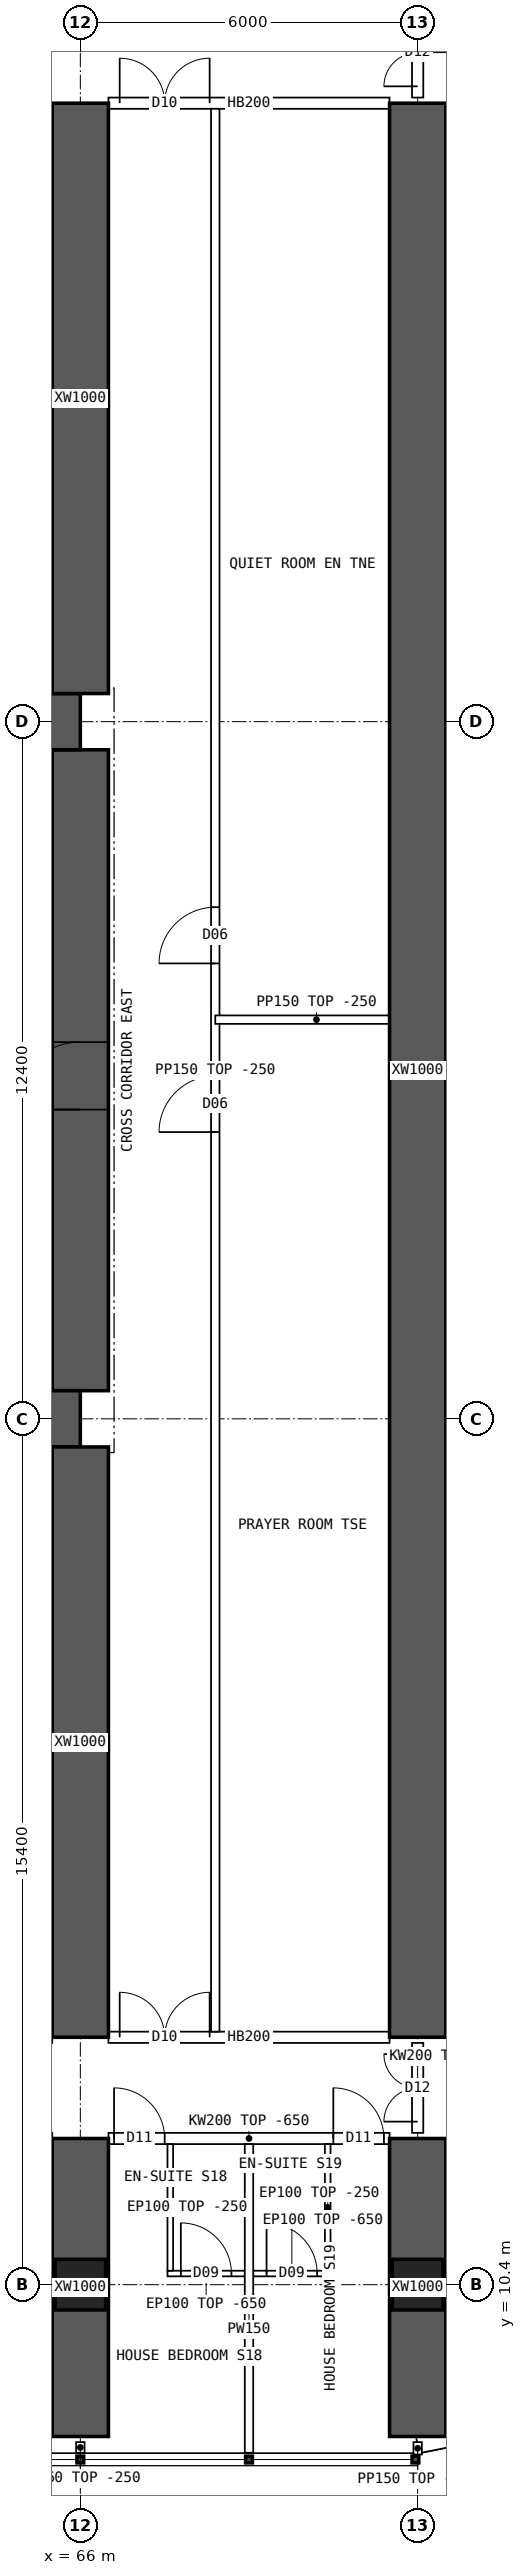
"""IFC4 building model, lengths in metres.
Left out: names, types, materials, properties, quantities, classifications, styles, units other than length and angle.
Written with IfcOpenShell. Run it as: python <this file> out.ifc"""

import sys

from ifc_helpers import new_model, si_unit, direction, frame, frame_2d, origin, origin_2d, place, context, subcontext, project, spatial, polyline, rectangle, hollow_rectangle, outline, extrude, element, fill, save


model = new_model("IFC4")
c1 = context("Model", 3, precision=1e-05, world=origin(), true_north=direction((0.0, 1.0)))
c2 = subcontext(c1, "Body", "Model", "MODEL_VIEW")
j1 = project(units=[si_unit("LENGTHUNIT", "METRE"), si_unit("PLANEANGLEUNIT", "RADIAN")], contexts=[c1])
p1 = place(None, origin())
s1 = spatial("IfcSite", under=j1, at=p1, CompositionType="ELEMENT")
p2 = place(p1, origin())
s2 = spatial("IfcBuilding", under=s1, at=p2, CompositionType="ELEMENT")
p3 = place(p2, frame((0.0, 0.0, 31.45)))
s3 = spatial("IfcBuildingStorey", under=s2, at=p3, CompositionType="ELEMENT", Elevation=31.45)
for number, where, z_axis, x_axis in (
    (1, (66.0, 10.4, 0.0), (0.0, 0.0, 1.0), (1.0, 0.0, 0.0)),
    (2, (72.0, 10.4, 0.0), (0.0, 0.0, 1.0), (1.0, 0.0, 0.0)),
):
    element("IfcColumn", number, at=place(p3, frame(where, z_axis=z_axis, x_axis=x_axis)), inside=s3, PredefinedType="COLUMN", context=c2, shape_type="SweptSolid", body=[
        extrude(hollow_rectangle(XDim=0.9, YDim=0.9, WallThickness=0.09, at=origin_2d()), origin(), (0.0, 0.0, 1.0), 3.75),
    ])
for number, where, z_axis, x_axis in (
    (3, (18.0, 25.8, 0.0), (0.0, 0.0, 1.0), (1.0, 0.0, 0.0)),
    (4, (18.0, 38.2, 0.0), (0.0, 0.0, 1.0), (1.0, 0.0, 0.0)),
):
    element("IfcWall", number, at=place(p3, frame(where, z_axis=z_axis, x_axis=x_axis)), inside=s3, PredefinedType="SHEAR", context=c2, shape_type="SweptSolid", body=[
        extrude(rectangle(XDim=48.0, YDim=1.0, at=frame_2d((24.0, 0.0))), origin(), (0.0, 0.0, 1.0), 3.75),
    ])
p4 = place(p3, frame((66.0, 26.3, 0.0), z_axis=(0.0, 0.0, 1.0), x_axis=(0.0, 1.0, 0.0)))
e5 = element("IfcWall", 5, at=p4, inside=s3, PredefinedType="SHEAR", context=c2, shape_type="SweptSolid", body=[
    extrude(rectangle(XDim=11.4, YDim=1.0, at=frame_2d((5.7, 0.0))), origin(), (0.0, 0.0, 1.0), 3.75),
])
p5 = place(p4, frame((5.0, 0.0, 0.0)))
e6 = element("IfcOpeningElement", 6, at=p5, cuts=e5, PredefinedType="OPENING", context=c2, shape_type="SweptSolid", body=[
    extrude(rectangle(XDim=1.2, YDim=2.1, at=frame_2d((0.6, 1.05))), frame((0.0, 0.51, 0.0), z_axis=(0.0, -1.0, 0.0), x_axis=(1.0, 0.0, 0.0)), (0.0, 0.0, 1.0), 1.02),
])
p6 = place(p3, frame((66.0, 7.7, 0.0), z_axis=(0.0, 0.0, 1.0), x_axis=(0.0, 1.0, 0.0)))
e7 = element("IfcWall", 7, at=p6, inside=s3, PredefinedType="SHEAR", context=c2, shape_type="SweptSolid", body=[
    extrude(rectangle(XDim=5.3, YDim=1.0, at=frame_2d((2.65, 0.0))), origin(), (0.0, 0.0, 1.0), 3.75),
])
for number, where, z_axis, x_axis in (
    (8, (66.0, 14.8, 0.0), (0.0, 0.0, 1.0), (0.0, 1.0, 0.0)),
    (9, (66.0, 38.7, 0.0), (0.0, 0.0, 1.0), (0.0, 1.0, 0.0)),
):
    element("IfcWall", number, at=place(p3, frame(where, z_axis=z_axis, x_axis=x_axis)), inside=s3, PredefinedType="SHEAR", context=c2, shape_type="SweptSolid", body=[
        extrude(rectangle(XDim=10.5, YDim=1.0, at=frame_2d((5.25, 0.0))), origin(), (0.0, 0.0, 1.0), 3.75),
    ])
p7 = place(p3, frame((72.0, 7.7, 0.0), z_axis=(0.0, 0.0, 1.0), x_axis=(0.0, 1.0, 0.0)))
e10 = element("IfcWall", 10, at=p7, inside=s3, PredefinedType="SHEAR", context=c2, shape_type="SweptSolid", body=[
    extrude(rectangle(XDim=5.3, YDim=1.0, at=frame_2d((2.65, 0.0))), origin(), (0.0, 0.0, 1.0), 3.75),
])
p8 = place(p3, frame((72.0, 14.8, 0.0), z_axis=(0.0, 0.0, 1.0), x_axis=(0.0, 1.0, 0.0)))
e11 = element("IfcWall", 11, at=p8, inside=s3, PredefinedType="SHEAR", context=c2, shape_type="SweptSolid", body=[
    extrude(rectangle(XDim=34.4, YDim=1.0, at=frame_2d((17.2, 0.0))), origin(), (0.0, 0.0, 1.0), 3.75),
])
p9 = place(p3, frame((72.0, 7.55, 0.0), z_axis=(0.0, 0.0, 1.0), x_axis=(0.980787251524, 0.195080412259, 0.0)))
e12 = element("IfcWall", 12, at=p9, inside=s3, PredefinedType="SOLIDWALL", context=c2, shape_type="SweptSolid", body=[
    extrude(outline(polyline([(-0.03, -0.15), (3.249, -0.15), (3.189, 0.15), (0.03, 0.15), (-0.03, -0.15)])), origin(), (0.0, 0.0, 1.0), 3.5),
])
p10 = place(p9, frame((0.909, 0.0, 0.9)))
e13 = element("IfcOpeningElement", 13, at=p10, cuts=e12, PredefinedType="OPENING", context=c2, shape_type="SweptSolid", body=[
    extrude(rectangle(XDim=1.4, YDim=1.8, at=frame_2d((0.7, 0.9))), frame((0.0, 0.16, 0.0), z_axis=(0.0, -1.0, 0.0), x_axis=(1.0, 0.0, 0.0)), (0.0, 0.0, 1.0), 0.32),
])
p11 = place(p3, frame((66.5, 13.0, 0.0), z_axis=(0.0, 0.0, 1.0), x_axis=(1.0, 0.0, 0.0)))
e14 = element("IfcWall", 14, at=p11, inside=s3, PredefinedType="SOLIDWALL", context=c2, shape_type="SweptSolid", body=[
    extrude(outline(polyline([(0.0, 0.0), (5.0, 0.0), (5.0, 3.1), (0.0, 3.1), (0.0, 0.0)])), frame((0.0, 0.1, 0.0), z_axis=(0.0, -1.0, 0.0), x_axis=(1.0, 0.0, 0.0)), (0.0, 0.0, 1.0), 0.2),
])
p12 = place(p11, frame((0.1, 0.0, 0.0)))
e15 = element("IfcOpeningElement", 15, at=p12, cuts=e14, PredefinedType="OPENING", context=c2, shape_type="SweptSolid", body=[
    extrude(rectangle(XDim=0.9, YDim=2.1, at=frame_2d((0.45, 1.05))), frame((0.0, 0.11, 0.0), z_axis=(0.0, -1.0, 0.0), x_axis=(1.0, 0.0, 0.0)), (0.0, 0.0, 1.0), 0.22),
])
p13 = place(p11, frame((4.0, 0.0, 0.0)))
e16 = element("IfcOpeningElement", 16, at=p13, cuts=e14, PredefinedType="OPENING", context=c2, shape_type="SweptSolid", body=[
    extrude(rectangle(XDim=0.9, YDim=2.1, at=frame_2d((0.45, 1.05))), frame((0.0, 0.11, 0.0), z_axis=(0.0, -1.0, 0.0), x_axis=(1.0, 0.0, 0.0)), (0.0, 0.0, 1.0), 0.22),
])
p14 = place(p3, frame((66.5, 14.8, 0.0), z_axis=(0.0, 0.0, 1.0), x_axis=(1.0, 0.0, 0.0)))
e17 = element("IfcWall", 17, at=p14, inside=s3, PredefinedType="SOLIDWALL", context=c2, shape_type="SweptSolid", body=[
    extrude(rectangle(XDim=5.0, YDim=0.2, at=frame_2d((2.5, 0.0))), origin(), (0.0, 0.0, 1.0), 3.5),
])
p15 = place(p14, frame((0.2, 0.0, 0.0)))
e18 = element("IfcOpeningElement", 18, at=p15, cuts=e17, PredefinedType="OPENING", context=c2, shape_type="SweptSolid", body=[
    extrude(rectangle(XDim=1.6, YDim=2.1, at=frame_2d((0.8, 1.05))), frame((0.0, 0.11, 0.0), z_axis=(0.0, -1.0, 0.0), x_axis=(1.0, 0.0, 0.0)), (0.0, 0.0, 1.0), 0.22),
])
p16 = place(p3, frame((66.5, 49.2, 0.0), z_axis=(0.0, 0.0, 1.0), x_axis=(1.0, 0.0, 0.0)))
e19 = element("IfcWall", 19, at=p16, inside=s3, PredefinedType="SOLIDWALL", context=c2, shape_type="SweptSolid", body=[
    extrude(rectangle(XDim=5.0, YDim=0.2, at=frame_2d((2.5, 0.0))), origin(), (0.0, 0.0, 1.0), 3.5),
])
p17 = place(p16, frame((0.2, 0.0, 0.0)))
e20 = element("IfcOpeningElement", 20, at=p17, cuts=e19, PredefinedType="OPENING", context=c2, shape_type="SweptSolid", body=[
    extrude(rectangle(XDim=1.6, YDim=2.1, at=frame_2d((0.8, 1.05))), frame((0.0, 0.11, 0.0), z_axis=(0.0, -1.0, 0.0), x_axis=(1.0, 0.0, 0.0)), (0.0, 0.0, 1.0), 0.22),
])
p18 = place(p3, frame((69.0, 7.41, 0.0), z_axis=(0.0, 0.0, 1.0), x_axis=(0.0, 1.0, 0.0)))
e21 = element("IfcWall", 21, at=p18, inside=s3, PredefinedType="PARTITIONING", context=c2, shape_type="SweptSolid", body=[
    extrude(outline(polyline([(0.0, 0.0), (5.49, 0.0), (5.49, 3.1), (5.442, 3.1), (5.44, 3.5), (3.192, 3.5), (3.19, 3.1), (2.792, 3.1), (2.79, 3.5), (0.0, 3.5), (0.0, 0.0)])), frame((0.0, 0.075, 0.0), z_axis=(0.0, -1.0, 0.0), x_axis=(1.0, 0.0, 0.0)), (0.0, 0.0, 1.0), 0.15),
])
p19 = place(p3, frame((68.925, 10.598, 0.0), z_axis=(0.0, 0.0, 1.0), x_axis=(-1.0, 0.0, 0.0)))
e22 = element("IfcWall", 22, at=p19, inside=s3, PredefinedType="PARTITIONING", context=c2, shape_type="SweptSolid", body=[
    extrude(outline(polyline([(0.0, 0.0), (1.375, 0.0), (1.375, 3.1), (0.0, 3.1), (0.0, 0.0)])), frame((0.0, 0.05, 0.0), z_axis=(0.0, -1.0, 0.0), x_axis=(1.0, 0.0, 0.0)), (0.0, 0.0, 1.0), 0.1),
])
p20 = place(p19, frame((0.238, 0.0, 0.0)))
e23 = element("IfcOpeningElement", 23, at=p20, cuts=e22, PredefinedType="OPENING", context=c2, shape_type="SweptSolid", body=[
    extrude(rectangle(XDim=0.9, YDim=2.1, at=frame_2d((0.45, 1.05))), frame((0.0, 0.06, 0.0), z_axis=(0.0, -1.0, 0.0), x_axis=(1.0, 0.0, 0.0)), (0.0, 0.0, 1.0), 0.12),
])
p21 = place(p3, frame((67.6, 10.648, 0.0), z_axis=(0.0, 0.0, 1.0), x_axis=(0.0, 1.0, 0.0)))
e24 = element("IfcWall", 24, at=p21, inside=s3, PredefinedType="PARTITIONING", context=c2, shape_type="SweptSolid", body=[
    extrude(outline(polyline([(0.0, 0.0), (2.252, 0.0), (2.252, 3.1), (2.204, 3.1), (2.202, 3.5), (0.0, 3.5), (0.0, 0.0)])), frame((0.0, 0.05, 0.0), z_axis=(0.0, -1.0, 0.0), x_axis=(1.0, 0.0, 0.0)), (0.0, 0.0, 1.0), 0.1),
])
p22 = place(p3, frame((70.45, 10.598, 0.0), z_axis=(0.0, 0.0, 1.0), x_axis=(-1.0, 0.0, 0.0)))
e25 = element("IfcWall", 25, at=p22, inside=s3, PredefinedType="PARTITIONING", context=c2, shape_type="SweptSolid", body=[
    extrude(outline(polyline([(0.0, 0.0), (1.375, 0.0), (1.375, 3.1), (0.0, 3.1), (0.0, 0.0)])), frame((0.0, 0.05, 0.0), z_axis=(0.0, -1.0, 0.0), x_axis=(1.0, 0.0, 0.0)), (0.0, 0.0, 1.0), 0.1),
])
p23 = place(p22, frame((0.238, 0.0, 0.0)))
e26 = element("IfcOpeningElement", 26, at=p23, cuts=e25, PredefinedType="OPENING", context=c2, shape_type="SweptSolid", body=[
    extrude(rectangle(XDim=0.9, YDim=2.1, at=frame_2d((0.45, 1.05))), frame((0.0, 0.06, 0.0), z_axis=(0.0, -1.0, 0.0), x_axis=(1.0, 0.0, 0.0)), (0.0, 0.0, 1.0), 0.12),
])
p24 = place(p3, frame((70.4, 10.648, 0.0), z_axis=(0.0, 0.0, 1.0), x_axis=(0.0, 1.0, 0.0)))
e27 = element("IfcWall", 27, at=p24, inside=s3, PredefinedType="PARTITIONING", context=c2, shape_type="SweptSolid", body=[
    extrude(outline(polyline([(0.0, 0.0), (2.252, 0.0), (2.252, 3.1), (2.204, 3.1), (2.202, 3.5), (0.0, 3.5), (0.0, 0.0)])), frame((0.0, 0.05, 0.0), z_axis=(0.0, -1.0, 0.0), x_axis=(1.0, 0.0, 0.0)), (0.0, 0.0, 1.0), 0.1),
])
p25 = place(p3, frame((68.4, 14.9, 0.0), z_axis=(0.0, 0.0, 1.0), x_axis=(0.0, 1.0, 0.0)))
e28 = element("IfcWall", 28, at=p25, inside=s3, PredefinedType="PARTITIONING", context=c2, shape_type="SweptSolid", body=[
    extrude(rectangle(XDim=34.2, YDim=0.15, at=frame_2d((17.1, 0.0))), origin(), (0.0, 0.0, 1.0), 3.5),
])
p26 = place(p25, frame((16.0, 0.0, 0.0)))
e29 = element("IfcOpeningElement", 29, at=p26, cuts=e28, PredefinedType="OPENING", context=c2, shape_type="SweptSolid", body=[
    extrude(rectangle(XDim=1.0, YDim=2.1, at=frame_2d((0.5, 1.05))), frame((0.0, 0.085, 0.0), z_axis=(0.0, -1.0, 0.0), x_axis=(1.0, 0.0, 0.0)), (0.0, 0.0, 1.0), 0.17),
])
p27 = place(p25, frame((19.0, 0.0, 0.0)))
e30 = element("IfcOpeningElement", 30, at=p27, cuts=e28, PredefinedType="OPENING", context=c2, shape_type="SweptSolid", body=[
    extrude(rectangle(XDim=1.0, YDim=2.1, at=frame_2d((0.5, 1.05))), frame((0.0, 0.085, 0.0), z_axis=(0.0, -1.0, 0.0), x_axis=(1.0, 0.0, 0.0)), (0.0, 0.0, 1.0), 0.17),
])
p28 = place(p3, frame((68.4, 32.9, 0.0), z_axis=(0.0, 0.0, 1.0), x_axis=(1.0, 0.0, 0.0)))
e31 = element("IfcWall", 31, at=p28, inside=s3, PredefinedType="PARTITIONING", context=c2, shape_type="SweptSolid", body=[
    extrude(rectangle(XDim=3.6, YDim=0.15, at=frame_2d((1.8, 0.0))), origin(), (0.0, 0.0, 1.0), 3.5),
])
p29 = place(p3, frame((72.075, 30.85, 0.0), z_axis=(0.0, 0.0, 1.0), x_axis=(1.0, 0.0, 0.0)))
e32 = element("IfcWall", 32, at=p29, inside=s3, PredefinedType="PARTITIONING", context=c2, shape_type="SweptSolid", body=[
    extrude(outline(polyline([(0.0, 0.0), (8.02, 0.0), (8.02, 3.5), (6.227, 3.5), (6.225, 3.05), (5.627, 3.05), (5.625, 3.5), (0.0, 3.5), (0.0, 0.0)])), frame((0.0, 0.075, 0.0), z_axis=(0.0, -1.0, 0.0), x_axis=(1.0, 0.0, 0.0)), (0.0, 0.0, 1.0), 0.15),
])
p30 = place(p3, frame((72.0, 13.1, 0.0), z_axis=(0.0, 0.0, 1.0), x_axis=(0.0, 1.0, 0.0)))
e33 = element("IfcWall", 33, at=p30, inside=s3, PredefinedType="SOLIDWALL", context=c2, shape_type="SweptSolid", body=[
    extrude(outline(polyline([(0.0, 0.0), (1.6, 0.0), (1.6, 3.05), (0.0, 3.05), (0.0, 0.0)])), frame((0.0, 0.1, 0.0), z_axis=(0.0, -1.0, 0.0), x_axis=(1.0, 0.0, 0.0)), (0.0, 0.0, 1.0), 0.2),
])
p31 = place(p30, frame((0.2, 0.0, 0.0)))
e34 = element("IfcOpeningElement", 34, at=p31, cuts=e33, PredefinedType="OPENING", context=c2, shape_type="SweptSolid", body=[
    extrude(rectangle(XDim=1.2, YDim=2.1, at=frame_2d((0.6, 1.05))), frame((0.0, 0.11, 0.0), z_axis=(0.0, -1.0, 0.0), x_axis=(1.0, 0.0, 0.0)), (0.0, 0.0, 1.0), 0.22),
])
p32 = place(p3, frame((72.0, 49.3, 0.0), z_axis=(0.0, 0.0, 1.0), x_axis=(0.0, 1.0, 0.0)))
e35 = element("IfcWall", 35, at=p32, inside=s3, PredefinedType="SOLIDWALL", context=c2, shape_type="SweptSolid", body=[
    extrude(outline(polyline([(0.0, 0.0), (1.6, 0.0), (1.6, 3.05), (0.0, 3.05), (0.0, 0.0)])), frame((0.0, 0.1, 0.0), z_axis=(0.0, -1.0, 0.0), x_axis=(1.0, 0.0, 0.0)), (0.0, 0.0, 1.0), 0.2),
])
p33 = place(p32, frame((0.2, 0.0, 0.0)))
e36 = element("IfcOpeningElement", 36, at=p33, cuts=e35, PredefinedType="OPENING", context=c2, shape_type="SweptSolid", body=[
    extrude(rectangle(XDim=1.2, YDim=2.1, at=frame_2d((0.6, 1.05))), frame((0.0, 0.11, 0.0), z_axis=(0.0, -1.0, 0.0), x_axis=(1.0, 0.0, 0.0)), (0.0, 0.0, 1.0), 0.22),
])
p34 = place(p3, frame((66.0, 7.6, 0.0), z_axis=(0.0, 0.0, 1.0), x_axis=(0.0, -1.0, 0.0)))
e37 = element("IfcWall", 37, at=p34, inside=s3, PredefinedType="PARTITIONING", context=c2, shape_type="SweptSolid", body=[
    extrude(rectangle(XDim=0.19, YDim=0.15, at=frame_2d((0.095, 0.0))), origin(), (0.0, 0.0, 1.0), 3.5),
])
p35 = place(p3, frame((72.0, 7.6, 0.0), z_axis=(0.0, 0.0, 1.0), x_axis=(0.0, -1.0, 0.0)))
e38 = element("IfcWall", 38, at=p35, inside=s3, PredefinedType="PARTITIONING", context=c2, shape_type="SweptSolid", body=[
    extrude(rectangle(XDim=0.22, YDim=0.15, at=frame_2d((0.11, 0.0))), origin(), (0.0, 0.0, 1.0), 3.5),
])
p36 = place(p5, origin())
e39 = element("IfcDoor", 39, at=p36, inside=s3, OperationType="SINGLE_SWING_LEFT", PredefinedType="DOOR", context=c2, shape_type="SweptSolid", body=[
    extrude(rectangle(XDim=1.2, YDim=2.1, at=frame_2d((0.6, 1.05))), frame((0.0, 0.025, 0.0), z_axis=(0.0, -1.0, 0.0), x_axis=(1.0, 0.0, 0.0)), (0.0, 0.0, 1.0), 0.05),
])
fill(e6, e39)
p37 = place(p15, origin())
e40 = element("IfcDoor", 40, at=p37, inside=s3, OperationType="DOUBLE_DOOR_SINGLE_SWING", PredefinedType="DOOR", context=c2, shape_type="SweptSolid", body=[
    extrude(rectangle(XDim=1.6, YDim=2.1, at=frame_2d((0.8, 1.05))), frame((0.0, 0.025, 0.0), z_axis=(0.0, -1.0, 0.0), x_axis=(1.0, 0.0, 0.0)), (0.0, 0.0, 1.0), 0.05),
])
fill(e18, e40)
p38 = place(p17, origin())
e41 = element("IfcDoor", 41, at=p38, inside=s3, OperationType="DOUBLE_DOOR_SINGLE_SWING", PredefinedType="DOOR", context=c2, shape_type="SweptSolid", body=[
    extrude(rectangle(XDim=1.6, YDim=2.1, at=frame_2d((0.8, 1.05))), frame((0.0, 0.025, 0.0), z_axis=(0.0, -1.0, 0.0), x_axis=(1.0, 0.0, 0.0)), (0.0, 0.0, 1.0), 0.05),
])
fill(e20, e41)
p39 = place(p20, origin())
e42 = element("IfcDoor", 42, at=p39, inside=s3, OperationType="SINGLE_SWING_RIGHT", PredefinedType="DOOR", context=c2, shape_type="SweptSolid", body=[
    extrude(rectangle(XDim=0.9, YDim=2.1, at=frame_2d((0.45, 1.05))), frame((0.0, 0.025, 0.0), z_axis=(0.0, -1.0, 0.0), x_axis=(1.0, 0.0, 0.0)), (0.0, 0.0, 1.0), 0.05),
])
fill(e23, e42)
p40 = place(p12, origin())
e43 = element("IfcDoor", 43, at=p40, inside=s3, OperationType="SINGLE_SWING_LEFT", PredefinedType="DOOR", context=c2, shape_type="SweptSolid", body=[
    extrude(rectangle(XDim=0.9, YDim=2.1, at=frame_2d((0.45, 1.05))), frame((0.0, 0.025, 0.0), z_axis=(0.0, -1.0, 0.0), x_axis=(1.0, 0.0, 0.0)), (0.0, 0.0, 1.0), 0.05),
])
fill(e15, e43)
p41 = place(p23, origin())
e44 = element("IfcDoor", 44, at=p41, inside=s3, OperationType="SINGLE_SWING_RIGHT", PredefinedType="DOOR", context=c2, shape_type="SweptSolid", body=[
    extrude(rectangle(XDim=0.9, YDim=2.1, at=frame_2d((0.45, 1.05))), frame((0.0, 0.025, 0.0), z_axis=(0.0, -1.0, 0.0), x_axis=(1.0, 0.0, 0.0)), (0.0, 0.0, 1.0), 0.05),
])
fill(e26, e44)
p42 = place(p13, origin())
e45 = element("IfcDoor", 45, at=p42, inside=s3, OperationType="SINGLE_SWING_LEFT", PredefinedType="DOOR", context=c2, shape_type="SweptSolid", body=[
    extrude(rectangle(XDim=0.9, YDim=2.1, at=frame_2d((0.45, 1.05))), frame((0.0, 0.025, 0.0), z_axis=(0.0, -1.0, 0.0), x_axis=(1.0, 0.0, 0.0)), (0.0, 0.0, 1.0), 0.05),
])
fill(e16, e45)
p43 = place(p26, origin())
e46 = element("IfcDoor", 46, at=p43, inside=s3, OperationType="SINGLE_SWING_LEFT", PredefinedType="DOOR", context=c2, shape_type="SweptSolid", body=[
    extrude(rectangle(XDim=1.0, YDim=2.1, at=frame_2d((0.5, 1.05))), frame((0.0, 0.025, 0.0), z_axis=(0.0, -1.0, 0.0), x_axis=(1.0, 0.0, 0.0)), (0.0, 0.0, 1.0), 0.05),
])
fill(e29, e46)
p44 = place(p27, origin())
e47 = element("IfcDoor", 47, at=p44, inside=s3, OperationType="SINGLE_SWING_LEFT", PredefinedType="DOOR", context=c2, shape_type="SweptSolid", body=[
    extrude(rectangle(XDim=1.0, YDim=2.1, at=frame_2d((0.5, 1.05))), frame((0.0, 0.025, 0.0), z_axis=(0.0, -1.0, 0.0), x_axis=(1.0, 0.0, 0.0)), (0.0, 0.0, 1.0), 0.05),
])
fill(e30, e47)
p45 = place(p31, origin())
e48 = element("IfcDoor", 48, at=p45, inside=s3, OperationType="DOUBLE_DOOR_SINGLE_SWING", PredefinedType="DOOR", context=c2, shape_type="SweptSolid", body=[
    extrude(rectangle(XDim=1.2, YDim=2.1, at=frame_2d((0.6, 1.05))), frame((0.0, 0.025, 0.0), z_axis=(0.0, -1.0, 0.0), x_axis=(1.0, 0.0, 0.0)), (0.0, 0.0, 1.0), 0.05),
])
fill(e34, e48)
p46 = place(p33, origin())
e49 = element("IfcDoor", 49, at=p46, inside=s3, OperationType="DOUBLE_DOOR_SINGLE_SWING", PredefinedType="DOOR", context=c2, shape_type="SweptSolid", body=[
    extrude(rectangle(XDim=1.2, YDim=2.1, at=frame_2d((0.6, 1.05))), frame((0.0, 0.025, 0.0), z_axis=(0.0, -1.0, 0.0), x_axis=(1.0, 0.0, 0.0)), (0.0, 0.0, 1.0), 0.05),
])
fill(e36, e49)
save(model, sys.argv[1])
